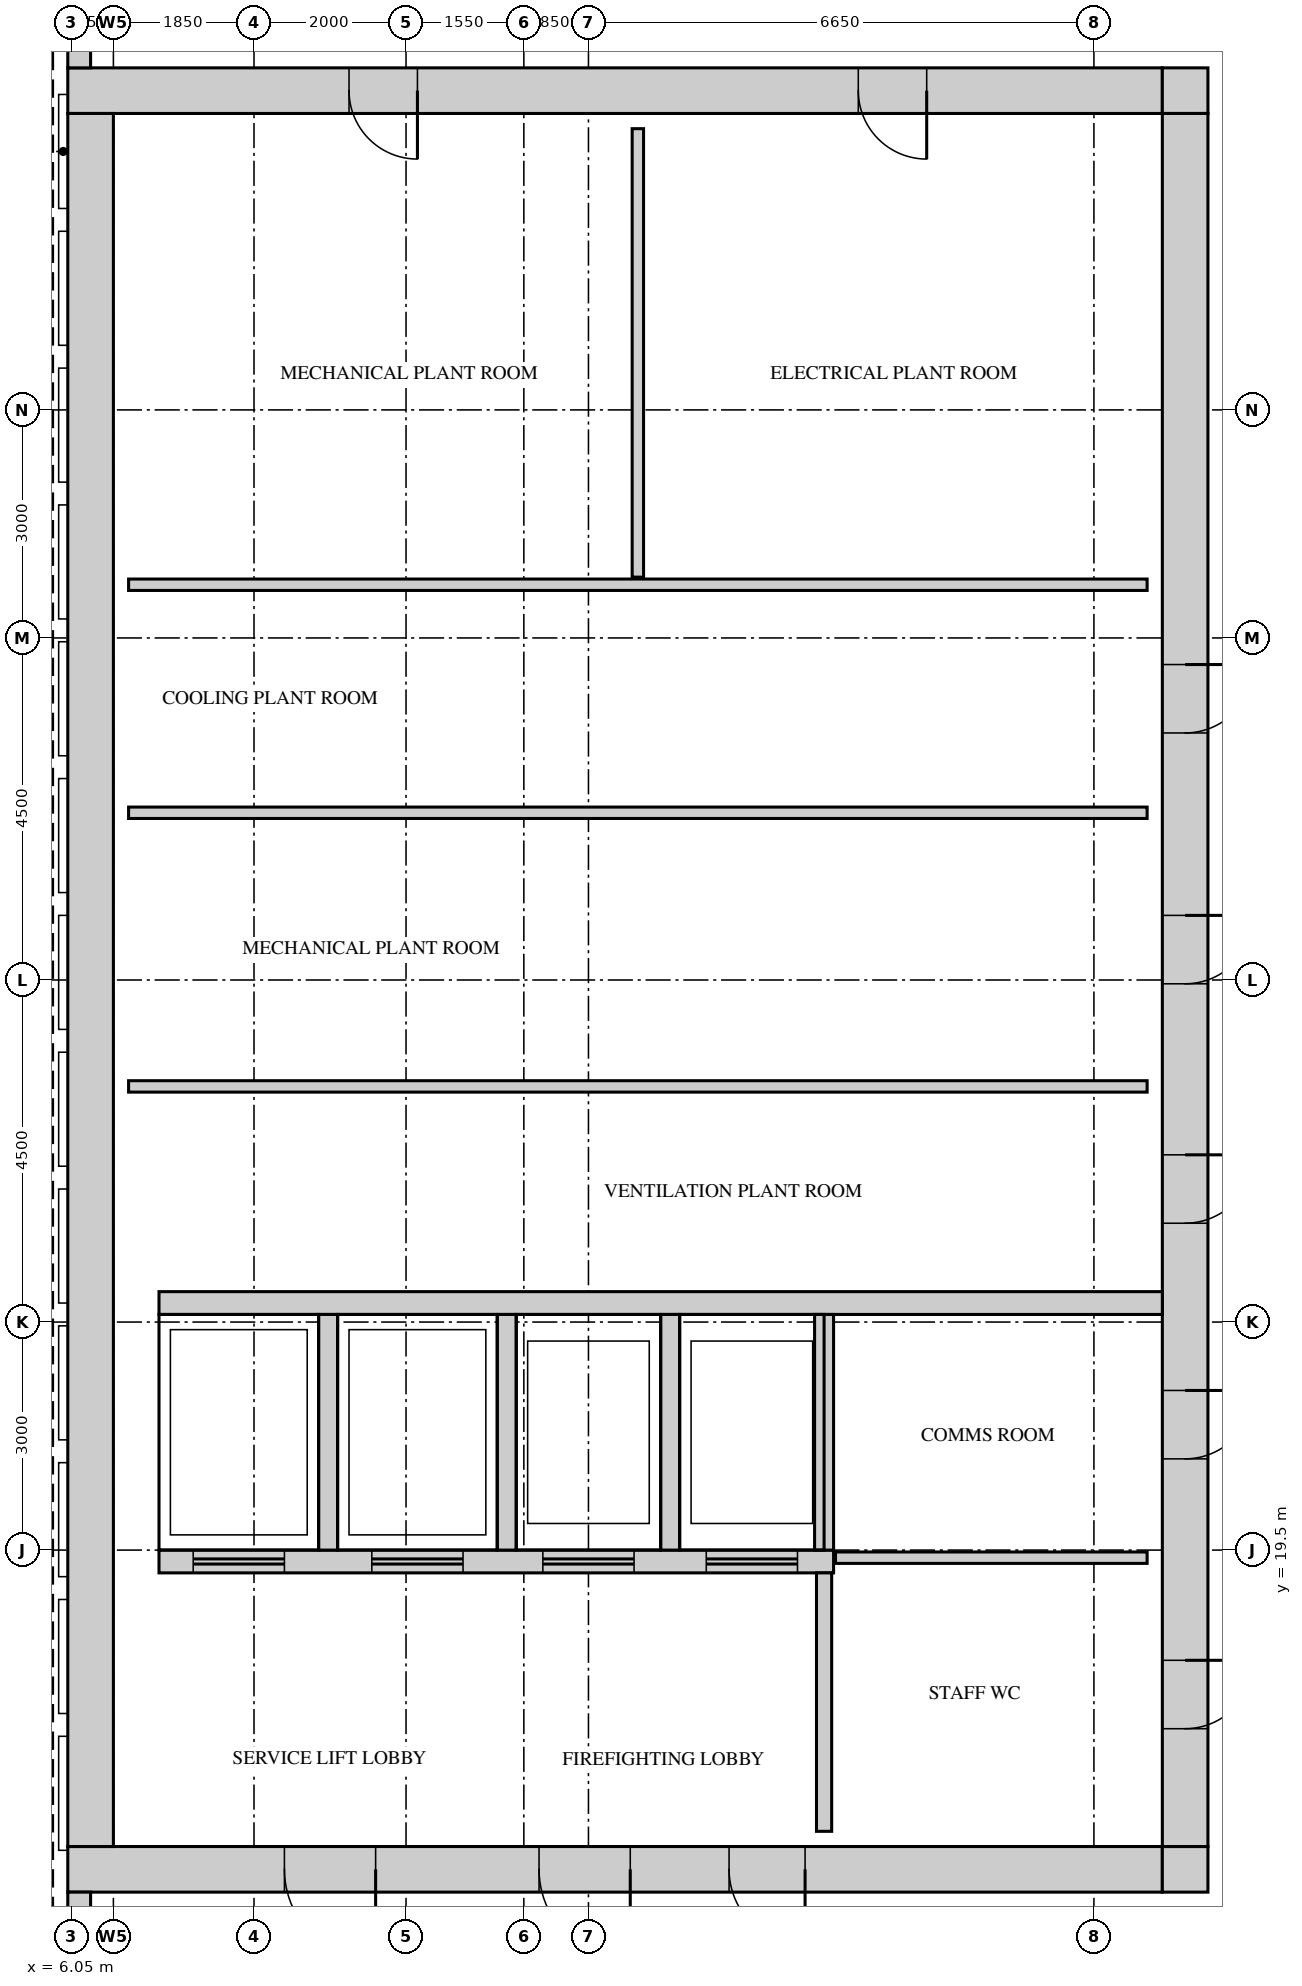
"""IFC4 building model, lengths in metres.
Left out: names, types, materials, properties, quantities, classifications, styles, units other than length and angle.
Written with IfcOpenShell. Run it as: python <this file> out.ifc"""

import sys

from ifc_helpers import new_model, si_unit, direction, frame, frame_2d, origin, place, context, subcontext, project, spatial, rectangle, extrude, source, transform, mapped, element, fill, save


model = new_model("IFC4")
c1 = context("Model", 3, precision=1e-05, world=origin(), true_north=direction((0.0, 1.0)))
c2 = subcontext(c1, "Body", "Model", "MODEL_VIEW")
j1 = project(units=[si_unit("LENGTHUNIT", "METRE"), si_unit("PLANEANGLEUNIT", "RADIAN")], contexts=[c1])
p1 = place(None, origin())
s1 = spatial("IfcSite", under=j1, at=p1, CompositionType="ELEMENT")
p2 = place(p1, origin())
s2 = spatial("IfcBuilding", under=s1, at=p2, CompositionType="ELEMENT")
p3 = place(p2, frame((0.0, 0.0, 334.7)))
s3 = spatial("IfcBuildingStorey", under=s2, at=p3, CompositionType="ELEMENT", Elevation=334.7)
m1 = source(origin(), c2, "Body", "SweptSolid", [
    extrude(rectangle(XDim=14.4, YDim=0.6, at=frame_2d((7.2, 0.0))), origin(), (0.0, 0.0, 1.0), 4.25),
])
p4 = place(p3, frame((6.0, 38.7, 0.0), z_axis=(0.0, 0.0, 1.0), x_axis=(1.0, 0.0, 0.0)))
e1 = element("IfcWall", 1, at=p4, inside=s3, PredefinedType="SHEAR", context=c2, shape_type="MappedRepresentation", body=[
    mapped(m1, transform((0.0, 0.0, 0.0))),
])
m2 = source(origin(), c2, "Body", "SweptSolid", [
    extrude(rectangle(XDim=0.9, YDim=2.1, at=frame_2d((0.45, 1.05))), frame((0.0, 0.31, 0.0), z_axis=(0.0, -1.0, 0.0), x_axis=(1.0, 0.0, 0.0)), (0.0, 0.0, 1.0), 0.62),
])
p5 = place(p4, frame((3.7, 0.0, 0.0)))
e2 = element("IfcOpeningElement", 2, at=p5, cuts=e1, PredefinedType="OPENING", context=c2, shape_type="MappedRepresentation", body=[
    mapped(m2, transform((0.0, 0.0, 0.0))),
])
p6 = place(p4, frame((10.4, 0.0, 0.0)))
e3 = element("IfcOpeningElement", 3, at=p6, cuts=e1, PredefinedType="OPENING", context=c2, shape_type="MappedRepresentation", body=[
    mapped(m2, transform((0.0, 0.0, 0.0))),
])
m3 = source(origin(), c2, "Body", "SweptSolid", [
    extrude(rectangle(XDim=0.6, YDim=0.6, at=frame_2d((0.3, 0.0))), origin(), (0.0, 0.0, 1.0), 4.25),
])
p7 = place(p3, frame((20.4, 38.7, 0.0), z_axis=(0.0, 0.0, 1.0), x_axis=(1.0, 0.0, 0.0)))
e4 = element("IfcWall", 4, at=p7, inside=s3, PredefinedType="SHEAR", context=c2, shape_type="MappedRepresentation", body=[
    mapped(m3, transform((0.0, 0.0, 0.0))),
])
p8 = place(p3, frame((6.0, 15.3, 0.0), z_axis=(0.0, 0.0, 1.0), x_axis=(1.0, 0.0, 0.0)))
e5 = element("IfcWall", 5, at=p8, inside=s3, PredefinedType="SHEAR", context=c2, shape_type="MappedRepresentation", body=[
    mapped(m1, transform((0.0, 0.0, 0.0))),
])
m4 = source(origin(), c2, "Body", "SweptSolid", [
    extrude(rectangle(XDim=1.2, YDim=2.1, at=frame_2d((0.6, 1.05))), frame((0.0, 0.31, 0.0), z_axis=(0.0, -1.0, 0.0), x_axis=(1.0, 0.0, 0.0)), (0.0, 0.0, 1.0), 0.62),
])
p9 = place(p8, frame((6.2, 0.0, 0.0)))
e6 = element("IfcOpeningElement", 6, at=p9, cuts=e5, PredefinedType="OPENING", context=c2, shape_type="MappedRepresentation", body=[
    mapped(m4, transform((0.0, 0.0, 0.0))),
])
p10 = place(p8, frame((2.85, 0.0, 0.0)))
e7 = element("IfcOpeningElement", 7, at=p10, cuts=e5, PredefinedType="OPENING", context=c2, shape_type="MappedRepresentation", body=[
    mapped(m4, transform((0.0, 0.0, 0.0))),
])
m5 = source(origin(), c2, "Body", "SweptSolid", [
    extrude(rectangle(XDim=1.0, YDim=2.1, at=frame_2d((0.5, 1.05))), frame((0.0, 0.31, 0.0), z_axis=(0.0, -1.0, 0.0), x_axis=(1.0, 0.0, 0.0)), (0.0, 0.0, 1.0), 0.62),
])
p11 = place(p8, frame((8.7, 0.0, 0.0)))
e8 = element("IfcOpeningElement", 8, at=p11, cuts=e5, PredefinedType="OPENING", context=c2, shape_type="MappedRepresentation", body=[
    mapped(m5, transform((0.0, 0.0, 0.0))),
])
p12 = place(p3, frame((20.4, 15.3, 0.0), z_axis=(0.0, 0.0, 1.0), x_axis=(1.0, 0.0, 0.0)))
e9 = element("IfcWall", 9, at=p12, inside=s3, PredefinedType="SHEAR", context=c2, shape_type="MappedRepresentation", body=[
    mapped(m3, transform((0.0, 0.0, 0.0))),
])
m6 = source(origin(), c2, "Body", "SweptSolid", [
    extrude(rectangle(XDim=22.8, YDim=0.6, at=frame_2d((11.4, 0.0))), origin(), (0.0, 0.0, 1.0), 4.25),
])
p13 = place(p3, frame((20.7, 15.6, 0.0), z_axis=(0.0, 0.0, 1.0), x_axis=(0.0, 1.0, 0.0)))
e10 = element("IfcWall", 10, at=p13, inside=s3, PredefinedType="SHEAR", context=c2, shape_type="MappedRepresentation", body=[
    mapped(m6, transform((0.0, 0.0, 0.0))),
])
p14 = place(p13, frame((8.2, 0.0, 0.0)))
e11 = element("IfcOpeningElement", 11, at=p14, cuts=e10, PredefinedType="OPENING", context=c2, shape_type="MappedRepresentation", body=[
    mapped(m2, transform((0.0, 0.0, 0.0))),
])
p15 = place(p13, frame((11.35, 0.0, 0.0)))
e12 = element("IfcOpeningElement", 12, at=p15, cuts=e10, PredefinedType="OPENING", context=c2, shape_type="MappedRepresentation", body=[
    mapped(m2, transform((0.0, 0.0, 0.0))),
])
p16 = place(p13, frame((14.65, 0.0, 0.0)))
e13 = element("IfcOpeningElement", 13, at=p16, cuts=e10, PredefinedType="OPENING", context=c2, shape_type="MappedRepresentation", body=[
    mapped(m2, transform((0.0, 0.0, 0.0))),
])
p17 = place(p13, frame((1.55, 0.0, 0.0)))
e14 = element("IfcOpeningElement", 14, at=p17, cuts=e10, PredefinedType="OPENING", context=c2, shape_type="MappedRepresentation", body=[
    mapped(m2, transform((0.0, 0.0, 0.0))),
])
p18 = place(p13, frame((5.1, 0.0, 0.0)))
e15 = element("IfcOpeningElement", 15, at=p18, cuts=e10, PredefinedType="OPENING", context=c2, shape_type="MappedRepresentation", body=[
    mapped(m2, transform((0.0, 0.0, 0.0))),
])
p19 = place(p3, frame((6.3, 15.6, 0.0), z_axis=(0.0, 0.0, 1.0), x_axis=(0.0, 1.0, 0.0)))
e16 = element("IfcWall", 16, at=p19, inside=s3, PredefinedType="SHEAR", context=c2, shape_type="MappedRepresentation", body=[
    mapped(m6, transform((0.0, 0.0, 0.0))),
])
m7 = source(origin(), c2, "Body", "SweptSolid", [
    extrude(rectangle(XDim=13.2, YDim=0.3, at=frame_2d((6.6, 0.0))), origin(), (0.0, 0.0, 1.0), 4.25),
])
p20 = place(p3, frame((7.2, 22.75, 0.0), z_axis=(0.0, 0.0, 1.0), x_axis=(1.0, 0.0, 0.0)))
e17 = element("IfcWall", 17, at=p20, inside=s3, PredefinedType="STANDARD", context=c2, shape_type="MappedRepresentation", body=[
    mapped(m7, transform((0.0, 0.0, 0.0))),
])
m8 = source(origin(), c2, "Body", "SweptSolid", [
    extrude(rectangle(XDim=8.875, YDim=0.3, at=frame_2d((4.438, 0.0))), origin(), (0.0, 0.0, 1.0), 4.25),
])
p21 = place(p3, frame((7.2, 19.35, 0.0), z_axis=(0.0, 0.0, 1.0), x_axis=(1.0, 0.0, 0.0)))
e18 = element("IfcWall", 18, at=p21, inside=s3, PredefinedType="STANDARD", context=c2, shape_type="MappedRepresentation", body=[
    mapped(m8, transform((0.0, 0.0, 0.0))),
])
m9 = source(origin(), c2, "Body", "SweptSolid", [
    extrude(rectangle(XDim=1.2, YDim=2.1, at=frame_2d((0.6, 1.05))), frame((0.0, 0.16, 0.0), z_axis=(0.0, -1.0, 0.0), x_axis=(1.0, 0.0, 0.0)), (0.0, 0.0, 1.0), 0.32),
])
p22 = place(p21, frame((0.45, 0.0, 0.0)))
e19 = element("IfcOpeningElement", 19, at=p22, cuts=e18, PredefinedType="OPENING", context=c2, shape_type="MappedRepresentation", body=[
    mapped(m9, transform((0.0, 0.0, 0.0))),
])
p23 = place(p21, frame((2.8, 0.0, 0.0)))
e20 = element("IfcOpeningElement", 20, at=p23, cuts=e18, PredefinedType="OPENING", context=c2, shape_type="MappedRepresentation", body=[
    mapped(m9, transform((0.0, 0.0, 0.0))),
])
p24 = place(p21, frame((5.05, 0.0, 0.0)))
e21 = element("IfcOpeningElement", 21, at=p24, cuts=e18, PredefinedType="OPENING", context=c2, shape_type="MappedRepresentation", body=[
    mapped(m9, transform((0.0, 0.0, 0.0))),
])
p25 = place(p21, frame((7.2, 0.0, 0.0)))
e22 = element("IfcOpeningElement", 22, at=p25, cuts=e18, PredefinedType="OPENING", context=c2, shape_type="MappedRepresentation", body=[
    mapped(m9, transform((0.0, 0.0, 0.0))),
])
m10 = source(origin(), c2, "Body", "SweptSolid", [
    extrude(rectangle(XDim=3.1, YDim=0.25, at=frame_2d((1.55, 0.0))), origin(), (0.0, 0.0, 1.0), 4.25),
])
for number, where, z_axis, x_axis in (
    (23, (9.425, 19.5, 0.0), (0.0, 0.0, 1.0), (0.0, 1.0, 0.0)),
    (24, (11.775, 19.5, 0.0), (0.0, 0.0, 1.0), (0.0, 1.0, 0.0)),
    (25, (13.925, 19.5, 0.0), (0.0, 0.0, 1.0), (0.0, 1.0, 0.0)),
    (26, (15.95, 19.5, 0.0), (0.0, 0.0, 1.0), (0.0, 1.0, 0.0)),
):
    element("IfcWall", number, at=place(p3, frame(where, z_axis=z_axis, x_axis=x_axis)), inside=s3, PredefinedType="STANDARD", context=c2, shape_type="MappedRepresentation", body=[
        mapped(m10, transform((0.0, 0.0, 0.0))),
    ])
m11 = source(origin(), c2, "Body", "SweptSolid", [
    extrude(rectangle(XDim=2.7, YDim=0.3, at=frame_2d((1.35, 0.0))), origin(), (0.0, 0.0, 1.0), 4.5),
])
p26 = place(p3, frame((6.15, 41.7, 0.0), z_axis=(0.0, 0.0, 1.0), x_axis=(0.0, -1.0, 0.0)))
e27 = element("IfcWall", 27, at=p26, inside=s3, PredefinedType="SOLIDWALL", context=c2, shape_type="MappedRepresentation", body=[
    mapped(m11, transform((0.0, 0.0, 0.0))),
])
m12 = source(origin(), c2, "Body", "SweptSolid", [
    extrude(rectangle(XDim=1.2, YDim=2.4, at=frame_2d((0.6, 1.2))), frame((0.0, 0.16, 0.0), z_axis=(0.0, -1.0, 0.0), x_axis=(1.0, 0.0, 0.0)), (0.0, 0.0, 1.0), 0.32),
])
p27 = place(p26, frame((0.75, 0.0, 0.9)))
e28 = element("IfcOpeningElement", 28, at=p27, cuts=e27, PredefinedType="OPENING", context=c2, shape_type="MappedRepresentation", body=[
    mapped(m12, transform((0.0, 0.0, 0.0))),
])
m13 = source(origin(), c2, "Body", "SweptSolid", [
    extrude(rectangle(XDim=3.0, YDim=0.3, at=frame_2d((1.5, 0.0))), origin(), (0.0, 0.0, 1.0), 4.5),
])
p28 = place(p3, frame((6.15, 15.0, 0.0), z_axis=(0.0, 0.0, 1.0), x_axis=(0.0, -1.0, 0.0)))
e29 = element("IfcWall", 29, at=p28, inside=s3, PredefinedType="SOLIDWALL", context=c2, shape_type="MappedRepresentation", body=[
    mapped(m13, transform((0.0, 0.0, 0.0))),
])
p29 = place(p28, frame((0.9, 0.0, 0.9)))
e30 = element("IfcOpeningElement", 30, at=p29, cuts=e29, PredefinedType="OPENING", context=c2, shape_type="MappedRepresentation", body=[
    mapped(m12, transform((0.0, 0.0, 0.0))),
])
m14 = source(origin(), c2, "Body", "SweptSolid", [
    extrude(rectangle(XDim=3.4, YDim=0.2, at=frame_2d((1.7, 0.0))), origin(), (0.0, 0.0, 1.0), 4.3),
])
p30 = place(p3, frame((15.95, 15.8, 0.0), z_axis=(0.0, 0.0, 1.0), x_axis=(0.0, 1.0, 0.0)))
e31 = element("IfcWall", 31, at=p30, inside=s3, PredefinedType="PARTITIONING", context=c2, shape_type="MappedRepresentation", body=[
    mapped(m14, transform((0.0, 0.0, 0.0))),
])
m15 = source(origin(), c2, "Body", "SweptSolid", [
    extrude(rectangle(XDim=4.1, YDim=0.15, at=frame_2d((2.05, 0.0))), origin(), (0.0, 0.0, 1.0), 4.3),
])
p31 = place(p3, frame((16.1, 19.4, 0.0), z_axis=(0.0, 0.0, 1.0), x_axis=(1.0, 0.0, 0.0)))
e32 = element("IfcWall", 32, at=p31, inside=s3, PredefinedType="PARTITIONING", context=c2, shape_type="MappedRepresentation", body=[
    mapped(m15, transform((0.0, 0.0, 0.0))),
])
m16 = source(origin(), c2, "Body", "SweptSolid", [
    extrude(rectangle(XDim=13.4, YDim=0.15, at=frame_2d((6.7, 0.0))), origin(), (0.0, 0.0, 1.0), 4.3),
])
for number, where, z_axis, x_axis in (
    (33, (6.8, 25.6, 0.0), (0.0, 0.0, 1.0), (1.0, 0.0, 0.0)),
    (34, (6.8, 29.2, 0.0), (0.0, 0.0, 1.0), (1.0, 0.0, 0.0)),
    (35, (6.8, 32.2, 0.0), (0.0, 0.0, 1.0), (1.0, 0.0, 0.0)),
):
    element("IfcWall", number, at=place(p3, frame(where, z_axis=z_axis, x_axis=x_axis)), inside=s3, PredefinedType="PARTITIONING", context=c2, shape_type="MappedRepresentation", body=[
        mapped(m16, transform((0.0, 0.0, 0.0))),
    ])
m17 = source(origin(), c2, "Body", "SweptSolid", [
    extrude(rectangle(XDim=5.9, YDim=0.15, at=frame_2d((2.95, 0.0))), origin(), (0.0, 0.0, 1.0), 4.3),
])
p32 = place(p3, frame((13.5, 32.3, 0.0), z_axis=(0.0, 0.0, 1.0), x_axis=(0.0, 1.0, 0.0)))
e36 = element("IfcWall", 36, at=p32, inside=s3, PredefinedType="PARTITIONING", context=c2, shape_type="MappedRepresentation", body=[
    mapped(m17, transform((0.0, 0.0, 0.0))),
])
m18 = source(origin(), c2, "Body", "SweptSolid", [
    extrude(rectangle(XDim=0.9, YDim=2.1, at=frame_2d((0.45, 1.05))), frame((0.0, 0.25, 0.0), z_axis=(0.0, -1.0, 0.0), x_axis=(1.0, 0.0, 0.0)), (0.0, 0.0, 1.0), 0.5),
])
p33 = place(p14, origin())
e37 = element("IfcDoor", 37, at=p33, inside=s3, OperationType="SINGLE_SWING_RIGHT", PredefinedType="DOOR", context=c2, shape_type="MappedRepresentation", body=[
    mapped(m18, transform((0.0, 0.0, 0.0))),
])
fill(e11, e37)
p34 = place(p15, origin())
e38 = element("IfcDoor", 38, at=p34, inside=s3, OperationType="SINGLE_SWING_RIGHT", PredefinedType="DOOR", context=c2, shape_type="MappedRepresentation", body=[
    mapped(m18, transform((0.0, 0.0, 0.0))),
])
fill(e12, e38)
p35 = place(p16, origin())
e39 = element("IfcDoor", 39, at=p35, inside=s3, OperationType="SINGLE_SWING_RIGHT", PredefinedType="DOOR", context=c2, shape_type="MappedRepresentation", body=[
    mapped(m18, transform((0.0, 0.0, 0.0))),
])
fill(e13, e39)
p36 = place(p5, origin())
e40 = element("IfcDoor", 40, at=p36, inside=s3, OperationType="SINGLE_SWING_RIGHT", PredefinedType="DOOR", context=c2, shape_type="MappedRepresentation", body=[
    mapped(m18, transform((0.0, 0.0, 0.0))),
])
fill(e2, e40)
p37 = place(p6, origin())
e41 = element("IfcDoor", 41, at=p37, inside=s3, OperationType="SINGLE_SWING_RIGHT", PredefinedType="DOOR", context=c2, shape_type="MappedRepresentation", body=[
    mapped(m18, transform((0.0, 0.0, 0.0))),
])
fill(e3, e41)
p38 = place(p17, origin())
e42 = element("IfcDoor", 42, at=p38, inside=s3, OperationType="SINGLE_SWING_RIGHT", PredefinedType="DOOR", context=c2, shape_type="MappedRepresentation", body=[
    mapped(m18, transform((0.0, 0.0, 0.0))),
])
fill(e14, e42)
p39 = place(p18, origin())
e43 = element("IfcDoor", 43, at=p39, inside=s3, OperationType="SINGLE_SWING_RIGHT", PredefinedType="DOOR", context=c2, shape_type="MappedRepresentation", body=[
    mapped(m18, transform((0.0, 0.0, 0.0))),
])
fill(e15, e43)
m19 = source(origin(), c2, "Body", "SweptSolid", [
    extrude(rectangle(XDim=1.2, YDim=2.1, at=frame_2d((0.6, 1.05))), frame((0.0, 0.25, 0.0), z_axis=(0.0, -1.0, 0.0), x_axis=(1.0, 0.0, 0.0)), (0.0, 0.0, 1.0), 0.5),
])
p40 = place(p9, origin())
e44 = element("IfcDoor", 44, at=p40, inside=s3, OperationType="SINGLE_SWING_RIGHT", PredefinedType="DOOR", context=c2, shape_type="MappedRepresentation", body=[
    mapped(m19, transform((0.0, 0.0, 0.0))),
])
fill(e6, e44)
p41 = place(p10, origin())
e45 = element("IfcDoor", 45, at=p41, inside=s3, OperationType="SINGLE_SWING_RIGHT", PredefinedType="DOOR", context=c2, shape_type="MappedRepresentation", body=[
    mapped(m19, transform((0.0, 0.0, 0.0))),
])
fill(e7, e45)
m20 = source(origin(), c2, "Body", "SweptSolid", [
    extrude(rectangle(XDim=1.0, YDim=2.1, at=frame_2d((0.5, 1.05))), frame((0.0, 0.25, 0.0), z_axis=(0.0, -1.0, 0.0), x_axis=(1.0, 0.0, 0.0)), (0.0, 0.0, 1.0), 0.5),
])
p42 = place(p11, origin())
e46 = element("IfcDoor", 46, at=p42, inside=s3, OperationType="SINGLE_SWING_RIGHT", PredefinedType="DOOR", context=c2, shape_type="MappedRepresentation", body=[
    mapped(m20, transform((0.0, 0.0, 0.0))),
])
fill(e8, e46)
m21 = source(origin(), c2, "Body", "SweptSolid", [
    extrude(rectangle(XDim=1.2, YDim=2.1, at=frame_2d((0.6, 1.05))), frame((0.0, 0.025, 0.0), z_axis=(0.0, -1.0, 0.0), x_axis=(1.0, 0.0, 0.0)), (0.0, 0.0, 1.0), 0.05),
])
p43 = place(p22, origin())
e47 = element("IfcDoor", 47, at=p43, inside=s3, OperationType="DOUBLE_DOOR_SLIDING", PredefinedType="DOOR", context=c2, shape_type="MappedRepresentation", body=[
    mapped(m21, transform((0.0, 0.0, 0.0))),
])
fill(e19, e47)
p44 = place(p23, origin())
e48 = element("IfcDoor", 48, at=p44, inside=s3, OperationType="DOUBLE_DOOR_SLIDING", PredefinedType="DOOR", context=c2, shape_type="MappedRepresentation", body=[
    mapped(m21, transform((0.0, 0.0, 0.0))),
])
fill(e20, e48)
p45 = place(p24, origin())
e49 = element("IfcDoor", 49, at=p45, inside=s3, OperationType="DOUBLE_DOOR_SLIDING", PredefinedType="DOOR", context=c2, shape_type="MappedRepresentation", body=[
    mapped(m21, transform((0.0, 0.0, 0.0))),
])
fill(e21, e49)
p46 = place(p25, origin())
e50 = element("IfcDoor", 50, at=p46, inside=s3, OperationType="DOUBLE_DOOR_SLIDING", PredefinedType="DOOR", context=c2, shape_type="MappedRepresentation", body=[
    mapped(m21, transform((0.0, 0.0, 0.0))),
])
fill(e22, e50)
save(model, sys.argv[1])
